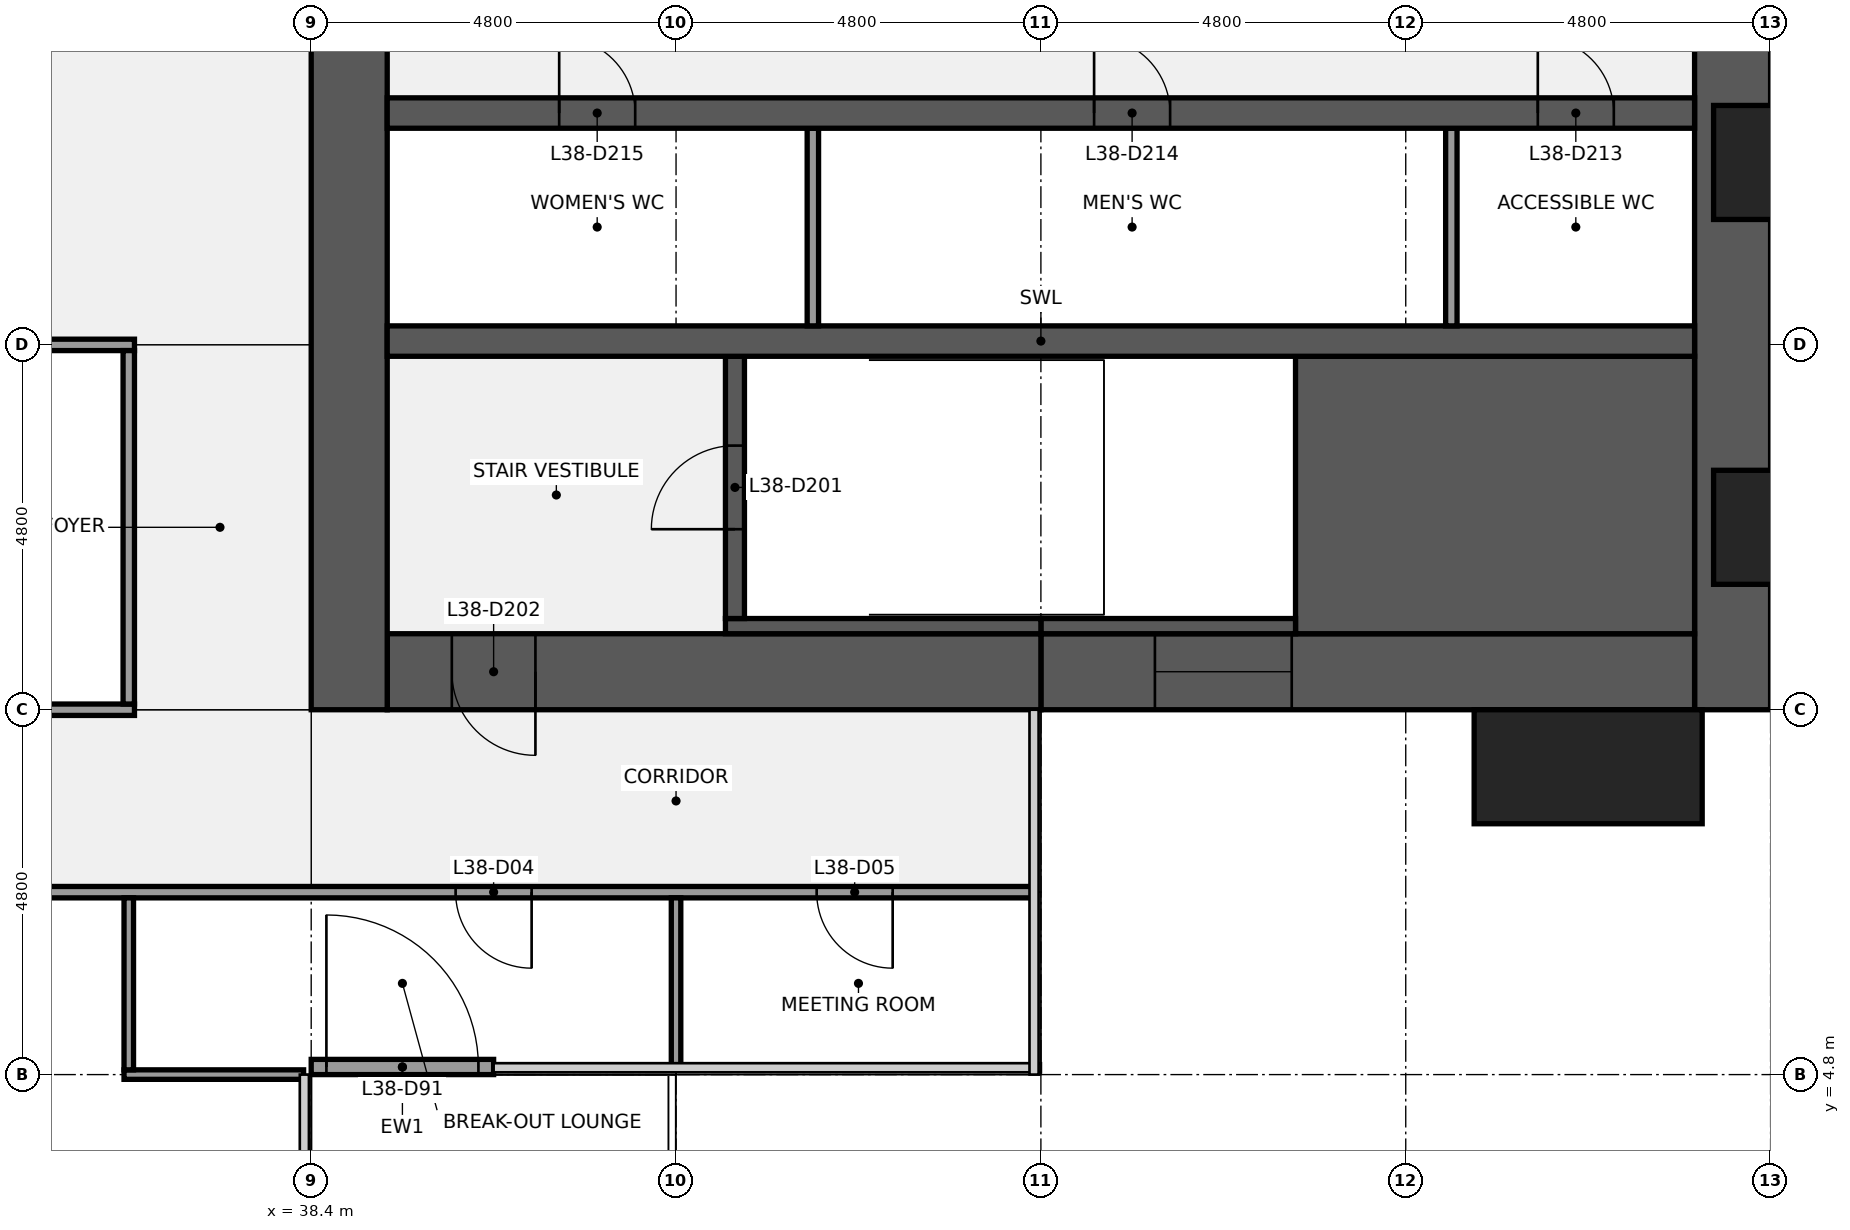
"""IFC4 building model, lengths in metres.
Left out: names, types, materials, properties, quantities, classifications, styles, units other than length and angle.
Written with IfcOpenShell. Run it as: python <this file> out.ifc"""

import sys

from ifc_helpers import new_model, si_unit, direction, frame, frame_2d, origin, origin_2d, place, context, subcontext, project, spatial, rectangle, extrude, element, fill, save


model = new_model("IFC4")
c1 = context("Model", 3, precision=1e-05, world=origin(), true_north=direction((0.0, 1.0)))
c2 = subcontext(c1, "Body", "Model", "MODEL_VIEW")
j1 = project(units=[si_unit("LENGTHUNIT", "METRE"), si_unit("PLANEANGLEUNIT", "RADIAN")], contexts=[c1])
p1 = place(None, origin())
s1 = spatial("IfcSite", under=j1, at=p1, CompositionType="ELEMENT")
p2 = place(p1, origin())
s2 = spatial("IfcBuilding", under=s1, at=p2, CompositionType="ELEMENT")
p3 = place(p2, frame((0.0, 0.0, 172.1)))
s3 = spatial("IfcBuildingStorey", under=s2, at=p3, CompositionType="ELEMENT", Elevation=172.1)
p4 = place(p3, frame((57.1, 38.4, 0.0), z_axis=(0.0, 0.0, 1.0), x_axis=(0.0, -1.0, 0.0)))
e1 = element("IfcWall", 1, at=p4, inside=s3, PredefinedType="SHEAR", context=c2, shape_type="SweptSolid", body=[
    extrude(rectangle(XDim=28.8, YDim=1.0, at=frame_2d((14.4, 0.0))), origin(), (0.0, 0.0, 1.0), 3.7),
])
p5 = place(p4, frame((18.45, 0.0, 0.9)))
e2 = element("IfcOpeningElement", 2, at=p5, cuts=e1, PredefinedType="OPENING", context=c2, shape_type="SweptSolid", body=[
    extrude(rectangle(XDim=1.5, YDim=1.5, at=frame_2d((0.75, 0.75))), frame((0.0, 0.51, 0.0), z_axis=(0.0, -1.0, 0.0), x_axis=(1.0, 0.0, 0.0)), (0.0, 0.0, 1.0), 1.02),
])
p6 = place(p4, frame((8.85, 0.0, 0.9)))
e3 = element("IfcOpeningElement", 3, at=p6, cuts=e1, PredefinedType="OPENING", context=c2, shape_type="SweptSolid", body=[
    extrude(rectangle(XDim=1.5, YDim=1.5, at=frame_2d((0.75, 0.75))), frame((0.0, 0.51, 0.0), z_axis=(0.0, -1.0, 0.0), x_axis=(1.0, 0.0, 0.0)), (0.0, 0.0, 1.0), 1.02),
])
p7 = place(p3, frame((56.6, 10.1, 0.0), z_axis=(0.0, 0.0, 1.0), x_axis=(-1.0, 0.0, 0.0)))
e4 = element("IfcWall", 4, at=p7, inside=s3, PredefinedType="SHEAR", context=c2, shape_type="SweptSolid", body=[
    extrude(rectangle(XDim=8.6, YDim=1.0, at=frame_2d((4.3, 0.0))), origin(), (0.0, 0.0, 1.0), 3.7),
])
p8 = place(p7, frame((5.3, 0.0, 0.9)))
e5 = element("IfcOpeningElement", 5, at=p8, cuts=e4, PredefinedType="OPENING", context=c2, shape_type="SweptSolid", body=[
    extrude(rectangle(XDim=1.8, YDim=1.5, at=frame_2d((0.9, 0.75))), frame((0.0, 0.51, 0.0), z_axis=(0.0, -1.0, 0.0), x_axis=(1.0, 0.0, 0.0)), (0.0, 0.0, 1.0), 1.02),
])
p9 = place(p3, frame((48.0, 10.1, 0.0), z_axis=(0.0, 0.0, 1.0), x_axis=(-1.0, 0.0, 0.0)))
e6 = element("IfcWall", 6, at=p9, inside=s3, PredefinedType="SHEAR", context=c2, shape_type="SweptSolid", body=[
    extrude(rectangle(XDim=8.6, YDim=1.0, at=frame_2d((4.3, 0.0))), origin(), (0.0, 0.0, 1.0), 3.7),
])
p10 = place(p9, frame((6.65, 0.0, 0.0)))
e7 = element("IfcOpeningElement", 7, at=p10, cuts=e6, PredefinedType="OPENING", context=c2, shape_type="SweptSolid", body=[
    extrude(rectangle(XDim=1.1, YDim=2.1, at=frame_2d((0.55, 1.05))), frame((0.0, 0.51, 0.0), z_axis=(0.0, -1.0, 0.0), x_axis=(1.0, 0.0, 0.0)), (0.0, 0.0, 1.0), 1.02),
])
p11 = place(p3, frame((38.9, 9.6, 0.0), z_axis=(0.0, 0.0, 1.0), x_axis=(0.0, 1.0, 0.0)))
e8 = element("IfcWall", 8, at=p11, inside=s3, PredefinedType="SHEAR", context=c2, shape_type="SweptSolid", body=[
    extrude(rectangle(XDim=28.8, YDim=1.0, at=frame_2d((14.4, 0.0))), origin(), (0.0, 0.0, 1.0), 3.7),
])
p12 = place(p11, frame((8.7, 0.0, 0.0)))
e9 = element("IfcOpeningElement", 9, at=p12, cuts=e8, PredefinedType="OPENING", context=c2, shape_type="SweptSolid", body=[
    extrude(rectangle(XDim=1.8, YDim=2.1, at=frame_2d((0.9, 1.05))), frame((0.0, 0.51, 0.0), z_axis=(0.0, -1.0, 0.0), x_axis=(1.0, 0.0, 0.0)), (0.0, 0.0, 1.0), 1.02),
])
p13 = place(p11, frame((18.3, 0.0, 0.0)))
e10 = element("IfcOpeningElement", 10, at=p13, cuts=e8, PredefinedType="OPENING", context=c2, shape_type="SweptSolid", body=[
    extrude(rectangle(XDim=1.8, YDim=2.1, at=frame_2d((0.9, 1.05))), frame((0.0, 0.51, 0.0), z_axis=(0.0, -1.0, 0.0), x_axis=(1.0, 0.0, 0.0)), (0.0, 0.0, 1.0), 1.02),
])
p14 = place(p3, frame((51.35, 12.425, 0.0), z_axis=(0.0, 0.0, 1.0), x_axis=(1.0, 0.0, 0.0)))
e11 = element("IfcWall", 11, at=p14, inside=s3, PredefinedType="SHEAR", context=c2, shape_type="SweptSolid", body=[
    extrude(rectangle(XDim=5.25, YDim=3.65, at=frame_2d((2.625, 0.0))), origin(), (0.0, 0.0, 1.0), 3.7),
])
p15 = place(p3, frame((48.0, 10.7, 0.0), z_axis=(0.0, 0.0, 1.0), x_axis=(1.0, 0.0, 0.0)))
e12 = element("IfcWall", 12, at=p15, inside=s3, PredefinedType="SHEAR", context=c2, shape_type="SweptSolid", body=[
    extrude(rectangle(XDim=3.35, YDim=0.2, at=frame_2d((1.675, 0.0))), origin(), (0.0, 0.0, 1.0), 3.7),
])
p16 = place(p3, frame((43.85, 10.7, 0.0), z_axis=(0.0, 0.0, 1.0), x_axis=(1.0, 0.0, 0.0)))
e13 = element("IfcWall", 13, at=p16, inside=s3, PredefinedType="SHEAR", context=c2, shape_type="SweptSolid", body=[
    extrude(rectangle(XDim=4.15, YDim=0.2, at=frame_2d((2.075, 0.0))), origin(), (0.0, 0.0, 1.0), 3.7),
])
p17 = place(p3, frame((43.975, 10.8, 0.0), z_axis=(0.0, 0.0, 1.0), x_axis=(0.0, 1.0, 0.0)))
e14 = element("IfcWall", 14, at=p17, inside=s3, PredefinedType="SHEAR", context=c2, shape_type="SweptSolid", body=[
    extrude(rectangle(XDim=3.45, YDim=0.25, at=frame_2d((1.725, 0.0))), origin(), (0.0, 0.0, 1.0), 3.7),
])
p18 = place(p17, frame((1.175, 0.0, 0.0)))
e15 = element("IfcOpeningElement", 15, at=p18, cuts=e14, PredefinedType="OPENING", context=c2, shape_type="SweptSolid", body=[
    extrude(rectangle(XDim=1.1, YDim=2.1, at=frame_2d((0.55, 1.05))), frame((0.0, 0.135, 0.0), z_axis=(0.0, -1.0, 0.0), x_axis=(1.0, 0.0, 0.0)), (0.0, 0.0, 1.0), 0.27),
])
p19 = place(p3, frame((39.4, 14.45, 0.0), z_axis=(0.0, 0.0, 1.0), x_axis=(1.0, 0.0, 0.0)))
e16 = element("IfcWall", 16, at=p19, inside=s3, PredefinedType="SHEAR", context=c2, shape_type="SweptSolid", body=[
    extrude(rectangle(XDim=17.2, YDim=0.4, at=frame_2d((8.6, 0.0))), origin(), (0.0, 0.0, 1.0), 3.7),
])
for number, where, z_axis, x_axis in (
    (17, (53.4, 14.65, 0.0), (0.0, 0.0, 1.0), (0.0, 1.0, 0.0)),
    (18, (45.0, 14.65, 0.0), (0.0, 0.0, 1.0), (0.0, 1.0, 0.0)),
):
    element("IfcWall", number, at=place(p3, frame(where, z_axis=z_axis, x_axis=x_axis)), inside=s3, PredefinedType="PARTITIONING", context=c2, shape_type="SweptSolid", body=[
        extrude(rectangle(XDim=2.6, YDim=0.15, at=frame_2d((1.3, 0.0))), origin(), (0.0, 0.0, 1.0), 3.7),
    ])
p20 = place(p3, frame((39.4, 17.45, 0.0), z_axis=(0.0, 0.0, 1.0), x_axis=(1.0, 0.0, 0.0)))
e19 = element("IfcWall", 19, at=p20, inside=s3, PredefinedType="SHEAR", context=c2, shape_type="SweptSolid", body=[
    extrude(rectangle(XDim=17.2, YDim=0.4, at=frame_2d((8.6, 0.0))), origin(), (0.0, 0.0, 1.0), 3.7),
])
p21 = place(p20, frame((15.137, 0.0, 0.0)))
e20 = element("IfcOpeningElement", 20, at=p21, cuts=e19, PredefinedType="OPENING", context=c2, shape_type="SweptSolid", body=[
    extrude(rectangle(XDim=1.0, YDim=2.1, at=frame_2d((0.5, 1.05))), frame((0.0, 0.21, 0.0), z_axis=(0.0, -1.0, 0.0), x_axis=(1.0, 0.0, 0.0)), (0.0, 0.0, 1.0), 0.42),
])
p22 = place(p20, frame((9.3, 0.0, 0.0)))
e21 = element("IfcOpeningElement", 21, at=p22, cuts=e19, PredefinedType="OPENING", context=c2, shape_type="SweptSolid", body=[
    extrude(rectangle(XDim=1.0, YDim=2.1, at=frame_2d((0.5, 1.05))), frame((0.0, 0.21, 0.0), z_axis=(0.0, -1.0, 0.0), x_axis=(1.0, 0.0, 0.0)), (0.0, 0.0, 1.0), 0.42),
])
p23 = place(p20, frame((2.262, 0.0, 0.0)))
e22 = element("IfcOpeningElement", 22, at=p23, cuts=e19, PredefinedType="OPENING", context=c2, shape_type="SweptSolid", body=[
    extrude(rectangle(XDim=1.0, YDim=2.1, at=frame_2d((0.5, 1.05))), frame((0.0, 0.21, 0.0), z_axis=(0.0, -1.0, 0.0), x_axis=(1.0, 0.0, 0.0)), (0.0, 0.0, 1.0), 0.42),
])
p24 = place(p3, frame((35.938, 4.8, 0.0), z_axis=(0.0, 0.0, 1.0), x_axis=(1.0, 0.0, 0.0)))
e23 = element("IfcWall", 23, at=p24, inside=s3, PredefinedType="PARTITIONING", context=c2, shape_type="SweptSolid", body=[
    extrude(rectangle(XDim=2.363, YDim=0.125, at=frame_2d((1.181, 0.0))), origin(), (0.0, 0.0, 1.0), 2.709),
])
p25 = place(p3, frame((9.7, 7.2, 0.0), z_axis=(0.0, 0.0, 1.0), x_axis=(1.0, 0.0, 0.0)))
e24 = element("IfcWall", 24, at=p25, inside=s3, PredefinedType="PARTITIONING", context=c2, shape_type="SweptSolid", body=[
    extrude(rectangle(XDim=38.2, YDim=0.15, at=frame_2d((19.1, 0.0))), origin(), (0.0, 0.0, 1.0), 2.709),
])
p26 = place(p25, frame((4.25, 0.0, 0.0)))
e25 = element("IfcOpeningElement", 25, at=p26, cuts=e24, PredefinedType="OPENING", context=c2, shape_type="SweptSolid", body=[
    extrude(rectangle(XDim=1.0, YDim=2.1, at=frame_2d((0.5, 1.05))), frame((0.0, 0.085, 0.0), z_axis=(0.0, -1.0, 0.0), x_axis=(1.0, 0.0, 0.0)), (0.0, 0.0, 1.0), 0.17),
])
p27 = place(p25, frame((13.8, 0.0, 0.0)))
e26 = element("IfcOpeningElement", 26, at=p27, cuts=e24, PredefinedType="OPENING", context=c2, shape_type="SweptSolid", body=[
    extrude(rectangle(XDim=1.0, YDim=2.1, at=frame_2d((0.5, 1.05))), frame((0.0, 0.085, 0.0), z_axis=(0.0, -1.0, 0.0), x_axis=(1.0, 0.0, 0.0)), (0.0, 0.0, 1.0), 0.17),
])
p28 = place(p25, frame((22.2, 0.0, 0.0)))
e27 = element("IfcOpeningElement", 27, at=p28, cuts=e24, PredefinedType="OPENING", context=c2, shape_type="SweptSolid", body=[
    extrude(rectangle(XDim=1.0, YDim=2.1, at=frame_2d((0.5, 1.05))), frame((0.0, 0.085, 0.0), z_axis=(0.0, -1.0, 0.0), x_axis=(1.0, 0.0, 0.0)), (0.0, 0.0, 1.0), 0.17),
])
p29 = place(p25, frame((30.6, 0.0, 0.0)))
e28 = element("IfcOpeningElement", 28, at=p29, cuts=e24, PredefinedType="OPENING", context=c2, shape_type="SweptSolid", body=[
    extrude(rectangle(XDim=1.0, YDim=2.1, at=frame_2d((0.5, 1.05))), frame((0.0, 0.085, 0.0), z_axis=(0.0, -1.0, 0.0), x_axis=(1.0, 0.0, 0.0)), (0.0, 0.0, 1.0), 0.17),
])
p30 = place(p25, frame((35.35, 0.0, 0.0)))
e29 = element("IfcOpeningElement", 29, at=p30, cuts=e24, PredefinedType="OPENING", context=c2, shape_type="SweptSolid", body=[
    extrude(rectangle(XDim=1.0, YDim=2.1, at=frame_2d((0.5, 1.05))), frame((0.0, 0.085, 0.0), z_axis=(0.0, -1.0, 0.0), x_axis=(1.0, 0.0, 0.0)), (0.0, 0.0, 1.0), 0.17),
])
p31 = place(p3, frame((21.525, 9.6, 0.0), z_axis=(0.0, 0.0, 1.0), x_axis=(1.0, 0.0, 0.0)))
e30 = element("IfcWall", 30, at=p31, inside=s3, PredefinedType="PARTITIONING", context=c2, shape_type="SweptSolid", body=[
    extrude(rectangle(XDim=14.55, YDim=0.15, at=frame_2d((7.275, 0.0))), origin(), (0.0, 0.0, 1.0), 2.709),
])
p32 = place(p31, frame((3.175, 0.0, 0.0)))
e31 = element("IfcOpeningElement", 31, at=p32, cuts=e30, PredefinedType="OPENING", context=c2, shape_type="SweptSolid", body=[
    extrude(rectangle(XDim=1.0, YDim=2.1, at=frame_2d((0.5, 1.05))), frame((0.0, 0.085, 0.0), z_axis=(0.0, -1.0, 0.0), x_axis=(1.0, 0.0, 0.0)), (0.0, 0.0, 1.0), 0.17),
])
p33 = place(p31, frame((10.375, 0.0, 0.0)))
e32 = element("IfcOpeningElement", 32, at=p33, cuts=e30, PredefinedType="OPENING", context=c2, shape_type="SweptSolid", body=[
    extrude(rectangle(XDim=1.0, YDim=2.1, at=frame_2d((0.5, 1.05))), frame((0.0, 0.085, 0.0), z_axis=(0.0, -1.0, 0.0), x_axis=(1.0, 0.0, 0.0)), (0.0, 0.0, 1.0), 0.17),
])
p34 = place(p3, frame((33.675, 14.4, 0.0), z_axis=(0.0, 0.0, 1.0), x_axis=(1.0, 0.0, 0.0)))
e33 = element("IfcWall", 33, at=p34, inside=s3, PredefinedType="PARTITIONING", context=c2, shape_type="SweptSolid", body=[
    extrude(rectangle(XDim=2.4, YDim=0.15, at=frame_2d((1.2, 0.0))), origin(), (0.0, 0.0, 1.0), 2.709),
])
p35 = place(p3, frame((36.0, 4.863, 0.0), z_axis=(0.0, 0.0, 1.0), x_axis=(0.0, 1.0, 0.0)))
e34 = element("IfcWall", 34, at=p35, inside=s3, PredefinedType="PARTITIONING", context=c2, shape_type="SweptSolid", body=[
    extrude(rectangle(XDim=2.262, YDim=0.125, at=frame_2d((1.131, 0.0))), origin(), (0.0, 0.0, 1.0), 2.709),
])
p36 = place(p3, frame((36.0, 9.675, 0.0), z_axis=(0.0, 0.0, 1.0), x_axis=(0.0, 1.0, 0.0)))
e35 = element("IfcWall", 35, at=p36, inside=s3, PredefinedType="PARTITIONING", context=c2, shape_type="SweptSolid", body=[
    extrude(rectangle(XDim=4.65, YDim=0.15, at=frame_2d((2.325, 0.0))), origin(), (0.0, 0.0, 1.0), 2.709),
])
p37 = place(p3, frame((43.2, 4.9, 0.0), z_axis=(0.0, 0.0, 1.0), x_axis=(0.0, 1.0, 0.0)))
e36 = element("IfcWall", 36, at=p37, inside=s3, PredefinedType="PARTITIONING", context=c2, shape_type="SweptSolid", body=[
    extrude(rectangle(XDim=2.225, YDim=0.125, at=frame_2d((1.113, 0.0))), origin(), (0.0, 0.0, 1.0), 2.709),
])
p38 = place(p3, frame((55.2, 8.85, 0.0), z_axis=(0.0, 0.0, 1.0), x_axis=(1.0, 0.0, 0.0)))
e37 = element("IfcColumn", 37, at=p38, inside=s3, PredefinedType="PILASTER", context=c2, shape_type="SweptSolid", body=[
    extrude(rectangle(XDim=3.0, YDim=1.5, at=origin_2d()), origin(), (0.0, 0.0, 1.0), 4.0),
])
p39 = place(p3, frame((38.4, 4.9, 0.0), z_axis=(0.0, 0.0, 1.0), x_axis=(1.0, 0.0, 0.0)))
e38 = element("IfcWall", 38, at=p39, inside=s3, PredefinedType="SOLIDWALL", context=c2, shape_type="SweptSolid", body=[
    extrude(rectangle(XDim=2.4, YDim=0.2, at=frame_2d((1.2, 0.0))), origin(), (0.0, 0.0, 1.0), 2.709),
])
p40 = place(p39, frame((0.2, 0.0, 0.0)))
e39 = element("IfcOpeningElement", 39, at=p40, cuts=e38, PredefinedType="OPENING", context=c2, shape_type="SweptSolid", body=[
    extrude(rectangle(XDim=2.0, YDim=2.1, at=frame_2d((1.0, 1.05))), frame((0.0, 0.11, 0.0), z_axis=(0.0, -1.0, 0.0), x_axis=(1.0, 0.0, 0.0)), (0.0, 0.0, 1.0), 0.22),
])
p41 = place(p18, origin())
e40 = element("IfcDoor", 40, at=p41, inside=s3, OperationType="SINGLE_SWING_LEFT", PredefinedType="DOOR", context=c2, shape_type="SweptSolid", body=[
    extrude(rectangle(XDim=1.1, YDim=2.1, at=frame_2d((0.55, 1.05))), frame((0.0, 0.025, 0.0), z_axis=(0.0, -1.0, 0.0), x_axis=(1.0, 0.0, 0.0)), (0.0, 0.0, 1.0), 0.05),
])
fill(e15, e40)
p42 = place(p10, origin())
e41 = element("IfcDoor", 41, at=p42, inside=s3, OperationType="SINGLE_SWING_LEFT", PredefinedType="DOOR", context=c2, shape_type="SweptSolid", body=[
    extrude(rectangle(XDim=1.1, YDim=2.1, at=frame_2d((0.55, 1.05))), frame((0.0, 0.025, 0.0), z_axis=(0.0, -1.0, 0.0), x_axis=(1.0, 0.0, 0.0)), (0.0, 0.0, 1.0), 0.05),
])
fill(e7, e41)
p43 = place(p21, origin())
e42 = element("IfcDoor", 42, at=p43, inside=s3, OperationType="SINGLE_SWING_LEFT", PredefinedType="DOOR", context=c2, shape_type="SweptSolid", body=[
    extrude(rectangle(XDim=1.0, YDim=2.1, at=frame_2d((0.5, 1.05))), frame((0.0, 0.025, 0.0), z_axis=(0.0, -1.0, 0.0), x_axis=(1.0, 0.0, 0.0)), (0.0, 0.0, 1.0), 0.05),
])
fill(e20, e42)
p44 = place(p22, origin())
e43 = element("IfcDoor", 43, at=p44, inside=s3, OperationType="SINGLE_SWING_LEFT", PredefinedType="DOOR", context=c2, shape_type="SweptSolid", body=[
    extrude(rectangle(XDim=1.0, YDim=2.1, at=frame_2d((0.5, 1.05))), frame((0.0, 0.025, 0.0), z_axis=(0.0, -1.0, 0.0), x_axis=(1.0, 0.0, 0.0)), (0.0, 0.0, 1.0), 0.05),
])
fill(e21, e43)
p45 = place(p23, origin())
e44 = element("IfcDoor", 44, at=p45, inside=s3, OperationType="SINGLE_SWING_LEFT", PredefinedType="DOOR", context=c2, shape_type="SweptSolid", body=[
    extrude(rectangle(XDim=1.0, YDim=2.1, at=frame_2d((0.5, 1.05))), frame((0.0, 0.025, 0.0), z_axis=(0.0, -1.0, 0.0), x_axis=(1.0, 0.0, 0.0)), (0.0, 0.0, 1.0), 0.05),
])
fill(e22, e44)
p46 = place(p8, origin())
e45 = element("IfcWindow", 45, at=p46, inside=s3, PartitioningType="SINGLE_PANEL", PredefinedType="WINDOW", context=c2, shape_type="SweptSolid", body=[
    extrude(rectangle(XDim=1.8, YDim=1.5, at=frame_2d((0.9, 0.75))), frame((0.0, 0.03, 0.0), z_axis=(0.0, -1.0, 0.0), x_axis=(1.0, 0.0, 0.0)), (0.0, 0.0, 1.0), 0.06),
])
fill(e5, e45)
p47 = place(p29, origin())
e46 = element("IfcDoor", 46, at=p47, inside=s3, OperationType="SINGLE_SWING_RIGHT", PredefinedType="DOOR", context=c2, shape_type="SweptSolid", body=[
    extrude(rectangle(XDim=1.0, YDim=2.1, at=frame_2d((0.5, 1.05))), frame((0.0, 0.025, 0.0), z_axis=(0.0, -1.0, 0.0), x_axis=(1.0, 0.0, 0.0)), (0.0, 0.0, 1.0), 0.05),
])
fill(e28, e46)
p48 = place(p30, origin())
e47 = element("IfcDoor", 47, at=p48, inside=s3, OperationType="SINGLE_SWING_RIGHT", PredefinedType="DOOR", context=c2, shape_type="SweptSolid", body=[
    extrude(rectangle(XDim=1.0, YDim=2.1, at=frame_2d((0.5, 1.05))), frame((0.0, 0.025, 0.0), z_axis=(0.0, -1.0, 0.0), x_axis=(1.0, 0.0, 0.0)), (0.0, 0.0, 1.0), 0.05),
])
fill(e29, e47)
p49 = place(p40, origin())
e48 = element("IfcDoor", 48, at=p49, inside=s3, OperationType="SINGLE_SWING_LEFT", PredefinedType="DOOR", context=c2, shape_type="SweptSolid", body=[
    extrude(rectangle(XDim=2.0, YDim=2.1, at=frame_2d((1.0, 1.05))), frame((0.0, 0.025, 0.0), z_axis=(0.0, -1.0, 0.0), x_axis=(1.0, 0.0, 0.0)), (0.0, 0.0, 1.0), 0.05),
])
fill(e39, e48)
save(model, sys.argv[1])
